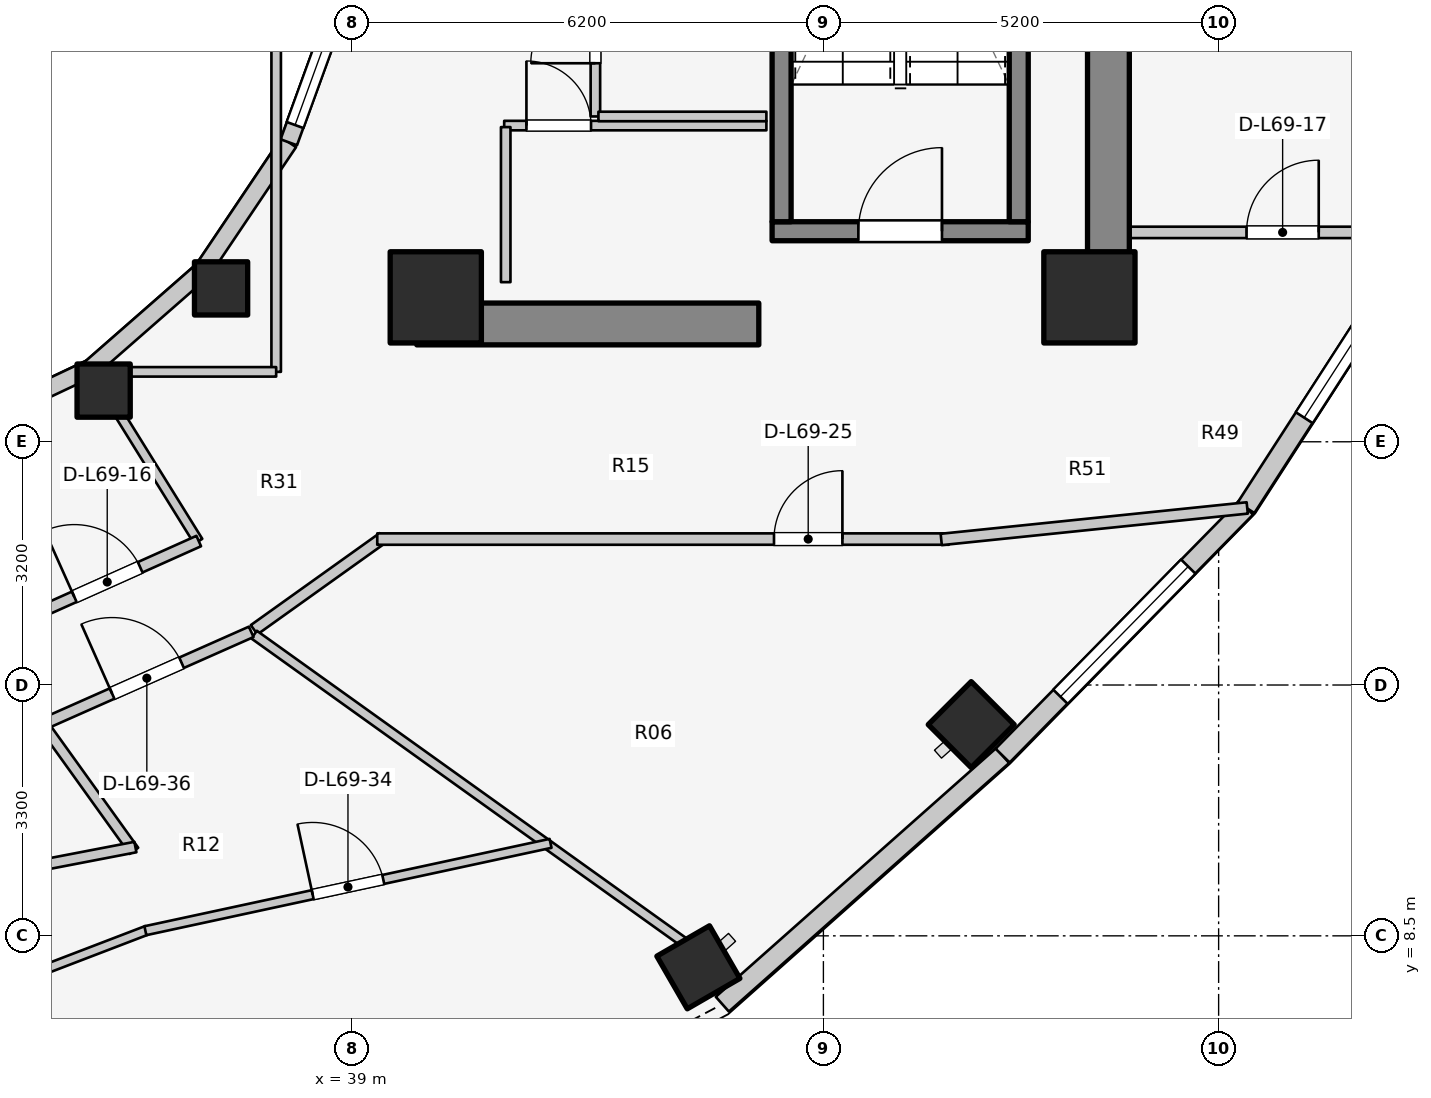
"""IFC4 building model, lengths in metres.
Left out: names, types, materials, properties, quantities, classifications, styles, units other than length and angle.
Written with IfcOpenShell. Run it as: python <this file> out.ifc"""

import sys

from ifc_helpers import new_model, si_unit, direction, frame, frame_2d, origin, origin_2d, place, context, subcontext, project, spatial, rectangle, extrude, element, fill, save


model = new_model("IFC4")
c1 = context("Model", 3, precision=1e-05, world=origin(), true_north=direction((0.0, 1.0)))
c2 = subcontext(c1, "Body", "Model", "MODEL_VIEW")
j1 = project(units=[si_unit("LENGTHUNIT", "METRE"), si_unit("PLANEANGLEUNIT", "RADIAN")], contexts=[c1])
p1 = place(None, origin())
s1 = spatial("IfcSite", under=j1, at=p1, CompositionType="ELEMENT")
p2 = place(p1, origin())
s2 = spatial("IfcBuilding", under=s1, at=p2, CompositionType="ELEMENT")
p3 = place(p2, frame((0.0, 0.0, 226.4)))
s3 = spatial("IfcBuildingStorey", under=s2, at=p3, CompositionType="ELEMENT", Elevation=226.4)
p4 = place(p3, frame((48.95, 17.05, 0.0), z_axis=(0.0, 0.0, 1.0), x_axis=(0.0, 1.0, 0.0)))
e1 = element("IfcWall", 1, at=p4, inside=s3, PredefinedType="SHEAR", context=c2, shape_type="SweptSolid", body=[
    extrude(rectangle(XDim=12.8, YDim=0.55, at=frame_2d((6.4, 0.0))), origin(), (0.0, 0.0, 1.0), 3.1),
])
p5 = place(p3, frame((39.85, 16.55, 0.0), z_axis=(0.0, 0.0, 1.0), x_axis=(1.0, 0.0, 0.0)))
e2 = element("IfcWall", 2, at=p5, inside=s3, PredefinedType="SHEAR", context=c2, shape_type="SweptSolid", body=[
    extrude(rectangle(XDim=4.5, YDim=0.55, at=frame_2d((2.25, 0.0))), origin(), (0.0, 0.0, 1.0), 3.1),
])
p6 = place(p3, frame((44.525, 17.77, 0.0), z_axis=(0.0, 0.0, 1.0), x_axis=(1.0, 0.0, 0.0)))
e3 = element("IfcWall", 3, at=p6, inside=s3, PredefinedType="SOLIDWALL", context=c2, shape_type="SweptSolid", body=[
    extrude(rectangle(XDim=3.37, YDim=0.25, at=frame_2d((1.685, 0.0))), origin(), (0.0, 0.0, 1.0), 3.1),
])
p7 = place(p6, frame((1.135, 0.0, 0.0)))
e4 = element("IfcOpeningElement", 4, at=p7, cuts=e3, PredefinedType="OPENING", context=c2, shape_type="SweptSolid", body=[
    extrude(rectangle(XDim=1.1, YDim=2.1, at=frame_2d((0.55, 1.05))), frame((0.0, 0.135, 0.0), z_axis=(0.0, -1.0, 0.0), x_axis=(1.0, 0.0, 0.0)), (0.0, 0.0, 1.0), 0.27),
])
for number, where, z_axis, x_axis in (
    (5, (44.65, 17.895, 0.0), (0.0, 0.0, 1.0), (0.0, 1.0, 0.0)),
    (6, (47.77, 17.895, 0.0), (0.0, 0.0, 1.0), (0.0, 1.0, 0.0)),
):
    element("IfcWall", number, at=place(p3, frame(where, z_axis=z_axis, x_axis=x_axis)), inside=s3, PredefinedType="SOLIDWALL", context=c2, shape_type="SweptSolid", body=[
        extrude(rectangle(XDim=7.81, YDim=0.25, at=frame_2d((3.905, 0.0))), origin(), (0.0, 0.0, 1.0), 3.1),
    ])
for number, where, z_axis, x_axis in (
    (7, (40.1, 16.9, 0.0), (0.0, 0.0, 1.0), (1.0, 0.0, 0.0)),
    (8, (48.7, 16.9, 0.0), (0.0, 0.0, 1.0), (1.0, 0.0, 0.0)),
):
    element("IfcColumn", number, at=place(p3, frame(where, z_axis=z_axis, x_axis=x_axis)), inside=s3, PredefinedType="COLUMN", context=c2, shape_type="SweptSolid", body=[
        extrude(rectangle(XDim=1.2, YDim=1.2, at=origin_2d()), origin(), (0.0, 0.0, 1.0), 3.1),
    ])
p8 = place(p3, frame((35.73, 15.673, 0.0), z_axis=(0.0, 0.0, 1.0), x_axis=(1.0, 0.0, 0.0)))
e9 = element("IfcColumn", 9, at=p8, inside=s3, PredefinedType="COLUMN", context=c2, shape_type="SweptSolid", body=[
    extrude(rectangle(XDim=0.7, YDim=0.7, at=origin_2d()), origin(), (0.0, 0.0, 1.0), 3.1),
])
p9 = place(p3, frame((43.555, 8.086, 0.0), z_axis=(0.0, 0.0, 1.0), x_axis=(0.5, -0.866025403784, 0.0)))
e10 = element("IfcColumn", 10, at=p9, inside=s3, PredefinedType="COLUMN", context=c2, shape_type="SweptSolid", body=[
    extrude(rectangle(XDim=0.8, YDim=0.8, at=origin_2d()), origin(), (0.0, 0.0, 1.0), 3.1),
])
p10 = place(p3, frame((37.275, 17.018, 0.0), z_axis=(0.0, 0.0, 1.0), x_axis=(1.0, 0.0, 0.0)))
e11 = element("IfcColumn", 11, at=p10, inside=s3, PredefinedType="COLUMN", context=c2, shape_type="SweptSolid", body=[
    extrude(rectangle(XDim=0.7, YDim=0.7, at=origin_2d()), origin(), (0.0, 0.0, 1.0), 3.1),
])
p11 = place(p3, frame((47.145, 11.279, 0.0), z_axis=(0.0, 0.0, 1.0), x_axis=(0.707106781187, -0.707106781187, 0.0)))
e12 = element("IfcColumn", 12, at=p11, inside=s3, PredefinedType="COLUMN", context=c2, shape_type="SweptSolid", body=[
    extrude(rectangle(XDim=0.8, YDim=0.8, at=origin_2d()), origin(), (0.0, 0.0, 1.0), 3.1),
])
p12 = place(p3, frame((33.843, 15.157, 0.0), z_axis=(0.0, 0.0, 1.0), x_axis=(0.904179699603, 0.427152280606, 0.0)))
e13 = element("IfcWall", 13, at=p12, inside=s3, PredefinedType="STANDARD", context=c2, shape_type="SweptSolid", body=[
    extrude(rectangle(XDim=1.899, YDim=0.23, at=frame_2d((0.95, 0.0))), origin(), (0.0, 0.0, 1.0), 2.16),
])
p13 = place(p3, frame((35.56, 15.968, 0.0), z_axis=(0.0, 0.0, 1.0), x_axis=(0.752576694707, 0.658504607869, 0.0)))
e14 = element("IfcWall", 14, at=p13, inside=s3, PredefinedType="STANDARD", context=c2, shape_type="SweptSolid", body=[
    extrude(rectangle(XDim=1.959, YDim=0.23, at=frame_2d((0.98, 0.0))), origin(), (0.0, 0.0, 1.0), 2.16),
])
p14 = place(p3, frame((37.035, 17.258, 0.0), z_axis=(0.0, 0.0, 1.0), x_axis=(0.558197800898, 0.829707909492, 0.0)))
e15 = element("IfcWall", 15, at=p14, inside=s3, PredefinedType="STANDARD", context=c2, shape_type="SweptSolid", body=[
    extrude(rectangle(XDim=2.027, YDim=0.23, at=frame_2d((1.013, 0.0))), origin(), (0.0, 0.0, 1.0), 2.16),
])
p15 = place(p3, frame((38.166, 18.94, 0.0), z_axis=(0.0, 0.0, 1.0), x_axis=(0.341423187295, 0.93990968033, 0.0)))
e16 = element("IfcWall", 16, at=p15, inside=s3, PredefinedType="STANDARD", context=c2, shape_type="SweptSolid", body=[
    extrude(rectangle(XDim=2.084, YDim=0.23, at=frame_2d((1.042, 0.0))), origin(), (0.0, 0.0, 1.0), 2.84),
])
p16 = place(p15, frame((0.242, 0.0, 0.85)))
e17 = element("IfcOpeningElement", 17, at=p16, cuts=e16, PredefinedType="OPENING", context=c2, shape_type="SweptSolid", body=[
    extrude(rectangle(XDim=1.6, YDim=1.65, at=frame_2d((0.8, 0.825))), frame((0.0, 0.125, 0.0), z_axis=(0.0, -1.0, 0.0), x_axis=(1.0, 0.0, 0.0)), (0.0, 0.0, 1.0), 0.25),
])
p17 = place(p3, frame((43.87, 7.601, 0.0), z_axis=(0.0, 0.0, 1.0), x_axis=(0.748165854006, 0.663511759428, 0.0)))
e18 = element("IfcWall", 18, at=p17, inside=s3, PredefinedType="STANDARD", context=c2, shape_type="SweptSolid", body=[
    extrude(rectangle(XDim=4.929, YDim=0.26, at=frame_2d((2.464, 0.0))), origin(), (0.0, 0.0, 1.0), 2.85),
])
p18 = place(p3, frame((47.558, 10.871, 0.0), z_axis=(0.0, 0.0, 1.0), x_axis=(0.700642973333, 0.713512034881, 0.0)))
e19 = element("IfcWall", 19, at=p18, inside=s3, PredefinedType="STANDARD", context=c2, shape_type="SweptSolid", body=[
    extrude(rectangle(XDim=4.572, YDim=0.26, at=frame_2d((2.286, 0.0))), origin(), (0.0, 0.0, 1.0), 2.85),
])
p19 = place(p18, frame((1.086, 0.0, 0.75)))
e20 = element("IfcOpeningElement", 20, at=p19, cuts=e19, PredefinedType="OPENING", context=c2, shape_type="SweptSolid", body=[
    extrude(rectangle(XDim=2.4, YDim=1.7, at=frame_2d((1.2, 0.85))), frame((0.0, 0.14, 0.0), z_axis=(0.0, -1.0, 0.0), x_axis=(1.0, 0.0, 0.0)), (0.0, 0.0, 1.0), 0.28),
])
p20 = place(p3, frame((50.761, 14.133, 0.0), z_axis=(0.0, 0.0, 1.0), x_axis=(0.542641766008, 0.839964233634, 0.0)))
e21 = element("IfcWall", 21, at=p20, inside=s3, PredefinedType="STANDARD", context=c2, shape_type="SweptSolid", body=[
    extrude(rectangle(XDim=4.319, YDim=0.26, at=frame_2d((2.16, 0.0))), origin(), (0.0, 0.0, 1.0), 2.85),
])
p21 = place(p20, frame((1.41, 0.0, 0.75)))
e22 = element("IfcOpeningElement", 22, at=p21, cuts=e21, PredefinedType="OPENING", context=c2, shape_type="SweptSolid", body=[
    extrude(rectangle(XDim=1.5, YDim=1.6, at=frame_2d((0.75, 0.8))), frame((0.0, 0.14, 0.0), z_axis=(0.0, -1.0, 0.0), x_axis=(1.0, 0.0, 0.0)), (0.0, 0.0, 1.0), 0.28),
])
p22 = place(p3, frame((41.0, 19.16, 0.0), z_axis=(0.0, 0.0, 1.0), x_axis=(1.0, 0.0, 0.0)))
e23 = element("IfcWall", 23, at=p22, inside=s3, PredefinedType="PARTITIONING", context=c2, shape_type="SweptSolid", body=[
    extrude(rectangle(XDim=3.45, YDim=0.125, at=frame_2d((1.725, 0.0))), origin(), (0.0, 0.0, 1.0), 2.12),
])
p23 = place(p22, frame((0.293, 0.0, 0.0)))
e24 = element("IfcOpeningElement", 24, at=p23, cuts=e23, PredefinedType="OPENING", context=c2, shape_type="SweptSolid", body=[
    extrude(rectangle(XDim=0.85, YDim=2.05, at=frame_2d((0.425, 1.025))), frame((0.0, 0.073, 0.0), z_axis=(0.0, -1.0, 0.0), x_axis=(1.0, 0.0, 0.0)), (0.0, 0.0, 1.0), 0.145),
])
p24 = place(p3, frame((41.02, 17.1, 0.0), z_axis=(0.0, 0.0, 1.0), x_axis=(0.0, 1.0, 0.0)))
e25 = element("IfcWall", 25, at=p24, inside=s3, PredefinedType="PARTITIONING", context=c2, shape_type="SweptSolid", body=[
    extrude(rectangle(XDim=2.04, YDim=0.125, at=frame_2d((1.02, 0.0))), origin(), (0.0, 0.0, 1.0), 2.855),
])
p25 = place(p3, frame((42.2, 19.28, 0.0), z_axis=(0.0, 0.0, 1.0), x_axis=(0.0, 1.0, 0.0)))
e26 = element("IfcWall", 26, at=p25, inside=s3, PredefinedType="PARTITIONING", context=c2, shape_type="SweptSolid", body=[
    extrude(rectangle(XDim=2.4, YDim=0.125, at=frame_2d((1.2, 0.0))), origin(), (0.0, 0.0, 1.0), 2.855),
])
p26 = place(p25, frame((0.7, 0.0, 0.0)))
e27 = element("IfcOpeningElement", 27, at=p26, cuts=e26, PredefinedType="OPENING", context=c2, shape_type="SweptSolid", body=[
    extrude(rectangle(XDim=0.85, YDim=2.05, at=frame_2d((0.425, 1.025))), frame((0.0, 0.073, 0.0), z_axis=(0.0, -1.0, 0.0), x_axis=(1.0, 0.0, 0.0)), (0.0, 0.0, 1.0), 0.145),
])
p27 = place(p3, frame((42.24, 19.28, 0.0), z_axis=(0.0, 0.0, 1.0), x_axis=(1.0, 0.0, 0.0)))
e28 = element("IfcWall", 28, at=p27, inside=s3, PredefinedType="PARTITIONING", context=c2, shape_type="SweptSolid", body=[
    extrude(rectangle(XDim=2.21, YDim=0.125, at=frame_2d((1.105, 0.0))), origin(), (0.0, 0.0, 1.0), 2.12),
])
p28 = place(p3, frame((35.55, 15.985, 0.0), z_axis=(0.0, 0.0, 1.0), x_axis=(0.527527080983, -0.849538215049, 0.0)))
e29 = element("IfcWall", 29, at=p28, inside=s3, PredefinedType="PARTITIONING", context=c2, shape_type="SweptSolid", body=[
    extrude(rectangle(XDim=2.701, YDim=0.125, at=frame_2d((1.351, 0.0))), origin(), (0.0, 0.0, 1.0), 2.376),
])
p29 = place(p3, frame((34.573, 12.616, 0.0), z_axis=(0.0, 0.0, 1.0), x_axis=(0.912628408652, 0.408790151203, 0.0)))
e30 = element("IfcWall", 30, at=p29, inside=s3, PredefinedType="PARTITIONING", context=c2, shape_type="SweptSolid", body=[
    extrude(rectangle(XDim=2.638, YDim=0.15, at=frame_2d((1.319, 0.0))), origin(), (0.0, 0.0, 1.0), 2.376),
])
p30 = place(p29, frame((0.844, 0.0, 0.0)))
e31 = element("IfcOpeningElement", 31, at=p30, cuts=e30, PredefinedType="OPENING", context=c2, shape_type="SweptSolid", body=[
    extrude(rectangle(XDim=0.95, YDim=2.1, at=frame_2d((0.475, 1.05))), frame((0.0, 0.085, 0.0), z_axis=(0.0, -1.0, 0.0), x_axis=(1.0, 0.0, 0.0)), (0.0, 0.0, 1.0), 0.17),
])
p31 = place(p3, frame((38.0, 15.92, 0.0), z_axis=(0.0, 0.0, 1.0), x_axis=(0.0, 1.0, 0.0)))
e32 = element("IfcWall", 32, at=p31, inside=s3, PredefinedType="PARTITIONING", context=c2, shape_type="SweptSolid", body=[
    extrude(rectangle(XDim=4.28, YDim=0.125, at=frame_2d((2.14, 0.0))), origin(), (0.0, 0.0, 1.0), 2.232),
])
p32 = place(p3, frame((35.4, 15.92, 0.0), z_axis=(0.0, 0.0, 1.0), x_axis=(1.0, 0.0, 0.0)))
e33 = element("IfcWall", 33, at=p32, inside=s3, PredefinedType="PARTITIONING", context=c2, shape_type="SweptSolid", body=[
    extrude(rectangle(XDim=2.6, YDim=0.125, at=frame_2d((1.3, 0.0))), origin(), (0.0, 0.0, 1.0), 2.232),
])
p33 = place(p3, frame((48.95, 17.755, 0.0), z_axis=(0.0, 0.0, 1.0), x_axis=(1.0, 0.0, 0.0)))
e34 = element("IfcWall", 34, at=p33, inside=s3, PredefinedType="PARTITIONING", context=c2, shape_type="SweptSolid", body=[
    extrude(rectangle(XDim=4.175, YDim=0.15, at=frame_2d((2.087, 0.0))), origin(), (0.0, 0.0, 1.0), 2.855),
])
p34 = place(p33, frame((1.817, 0.0, 0.0)))
e35 = element("IfcOpeningElement", 35, at=p34, cuts=e34, PredefinedType="OPENING", context=c2, shape_type="SweptSolid", body=[
    extrude(rectangle(XDim=0.95, YDim=2.1, at=frame_2d((0.475, 1.05))), frame((0.0, 0.085, 0.0), z_axis=(0.0, -1.0, 0.0), x_axis=(1.0, 0.0, 0.0)), (0.0, 0.0, 1.0), 0.17),
])
p35 = place(p3, frame((37.71, 12.527, 0.0), z_axis=(0.0, 0.0, 1.0), x_axis=(0.813780999276, 0.581171648669, 0.0)))
e36 = element("IfcWall", 36, at=p35, inside=s3, PredefinedType="PARTITIONING", context=c2, shape_type="SweptSolid", body=[
    extrude(rectangle(XDim=2.082, YDim=0.15, at=frame_2d((1.041, 0.0))), origin(), (0.0, 0.0, 1.0), 2.376),
])
p36 = place(p3, frame((39.33, 13.72, 0.0), z_axis=(0.0, 0.0, 1.0), x_axis=(1.0, 0.0, 0.0)))
e37 = element("IfcWall", 37, at=p36, inside=s3, PredefinedType="PARTITIONING", context=c2, shape_type="SweptSolid", body=[
    extrude(rectangle(XDim=7.52, YDim=0.15, at=frame_2d((3.76, 0.0))), origin(), (0.0, 0.0, 1.0), 2.376),
])
p37 = place(p36, frame((5.22, 0.0, 0.0)))
e38 = element("IfcOpeningElement", 38, at=p37, cuts=e37, PredefinedType="OPENING", context=c2, shape_type="SweptSolid", body=[
    extrude(rectangle(XDim=0.9, YDim=2.1, at=frame_2d((0.45, 1.05))), frame((0.0, 0.085, 0.0), z_axis=(0.0, -1.0, 0.0), x_axis=(1.0, 0.0, 0.0)), (0.0, 0.0, 1.0), 0.17),
])
p38 = place(p3, frame((46.75, 13.715, 0.0), z_axis=(0.0, 0.0, 1.0), x_axis=(0.994734711466, 0.102483431859, 0.0)))
e39 = element("IfcWall", 39, at=p38, inside=s3, PredefinedType="PARTITIONING", context=c2, shape_type="SweptSolid", body=[
    extrude(rectangle(XDim=4.047, YDim=0.15, at=frame_2d((2.024, 0.0))), origin(), (0.0, 0.0, 1.0), 2.22),
])
p39 = place(p3, frame((37.71, 12.463, 0.0), z_axis=(0.0, 0.0, 1.0), x_axis=(0.813163816543, -0.582034885093, 0.0)))
e40 = element("IfcWall", 40, at=p39, inside=s3, PredefinedType="PARTITIONING", context=c2, shape_type="SweptSolid", body=[
    extrude(rectangle(XDim=6.955, YDim=0.125, at=frame_2d((3.477, 0.0))), origin(), (0.0, 0.0, 1.0), 2.376),
])
p40 = place(p3, frame((31.953, 6.908, 0.0), z_axis=(0.0, 0.0, 1.0), x_axis=(0.933766866443, 0.357881878744, 0.0)))
e41 = element("IfcWall", 41, at=p40, inside=s3, PredefinedType="MOVABLE", context=c2, shape_type="SweptSolid", body=[
    extrude(rectangle(XDim=4.653, YDim=0.12, at=frame_2d((2.327, 0.0))), origin(), (0.0, 0.0, 1.0), 2.376),
])
p41 = place(p3, frame((36.279, 8.567, 0.0), z_axis=(0.0, 0.0, 1.0), x_axis=(0.977534972695, 0.210773283785, 0.0)))
e42 = element("IfcWall", 42, at=p41, inside=s3, PredefinedType="MOVABLE", context=c2, shape_type="SweptSolid", body=[
    extrude(rectangle(XDim=5.453, YDim=0.12, at=frame_2d((2.727, 0.0))), origin(), (0.0, 0.0, 1.0), 2.376),
])
p42 = place(p41, frame((2.252, 0.0, 0.0)))
e43 = element("IfcOpeningElement", 43, at=p42, cuts=e42, PredefinedType="OPENING", context=c2, shape_type="SweptSolid", body=[
    extrude(rectangle(XDim=0.95, YDim=2.1, at=frame_2d((0.475, 1.05))), frame((0.0, 0.07, 0.0), z_axis=(0.0, -1.0, 0.0), x_axis=(1.0, 0.0, 0.0)), (0.0, 0.0, 1.0), 0.14),
])
p43 = place(p3, frame((34.903, 11.324, 0.0), z_axis=(0.0, 0.0, 1.0), x_axis=(0.583259891741, -0.812285601673, 0.0)))
e44 = element("IfcWall", 44, at=p43, inside=s3, PredefinedType="PLUMBINGWALL", context=c2, shape_type="SweptSolid", body=[
    extrude(rectangle(XDim=2.1, YDim=0.14, at=frame_2d((1.05, 0.0))), origin(), (0.0, 0.0, 1.0), 2.385),
])
p44 = place(p3, frame((31.951, 8.861, 0.0), z_axis=(0.0, 0.0, 1.0), x_axis=(0.98198484664, 0.188959680803, 0.0)))
e45 = element("IfcWall", 45, at=p44, inside=s3, PredefinedType="PLUMBINGWALL", context=c2, shape_type="SweptSolid", body=[
    extrude(rectangle(XDim=4.274, YDim=0.14, at=frame_2d((2.137, 0.0))), origin(), (0.0, 0.0, 1.0), 2.376),
])
p45 = place(p44, frame((1.687, 0.0, 0.0)))
e46 = element("IfcOpeningElement", 46, at=p45, cuts=e45, PredefinedType="OPENING", context=c2, shape_type="SweptSolid", body=[
    extrude(rectangle(XDim=0.9, YDim=2.1, at=frame_2d((0.45, 1.05))), frame((0.0, 0.08, 0.0), z_axis=(0.0, -1.0, 0.0), x_axis=(1.0, 0.0, 0.0)), (0.0, 0.0, 1.0), 0.16),
])
p46 = place(p3, frame((34.925, 11.281, 0.0), z_axis=(0.0, 0.0, 1.0), x_axis=(0.914139569865, 0.405399613724, 0.0)))
e47 = element("IfcWall", 47, at=p46, inside=s3, PredefinedType="PARTITIONING", context=c2, shape_type="SweptSolid", body=[
    extrude(rectangle(XDim=3.005, YDim=0.15, at=frame_2d((1.502, 0.0))), origin(), (0.0, 0.0, 1.0), 2.376),
])
p47 = place(p46, frame((1.002, 0.0, 0.0)))
e48 = element("IfcOpeningElement", 48, at=p47, cuts=e47, PredefinedType="OPENING", context=c2, shape_type="SweptSolid", body=[
    extrude(rectangle(XDim=1.0, YDim=2.1, at=frame_2d((0.5, 1.05))), frame((0.0, 0.085, 0.0), z_axis=(0.0, -1.0, 0.0), x_axis=(1.0, 0.0, 0.0)), (0.0, 0.0, 1.0), 0.17),
])
p48 = place(p16, origin())
e49 = element("IfcWindow", 49, at=p48, inside=s3, PartitioningType="SINGLE_PANEL", PredefinedType="WINDOW", context=c2, shape_type="SweptSolid", body=[
    extrude(rectangle(XDim=1.6, YDim=1.65, at=frame_2d((0.8, 0.825))), frame((0.0, 0.03, 0.0), z_axis=(0.0, -1.0, 0.0), x_axis=(1.0, 0.0, 0.0)), (0.0, 0.0, 1.0), 0.06),
])
fill(e17, e49)
p49 = place(p19, origin())
e50 = element("IfcWindow", 50, at=p49, inside=s3, PartitioningType="SINGLE_PANEL", PredefinedType="WINDOW", context=c2, shape_type="SweptSolid", body=[
    extrude(rectangle(XDim=2.4, YDim=1.7, at=frame_2d((1.2, 0.85))), frame((0.0, 0.03, 0.0), z_axis=(0.0, -1.0, 0.0), x_axis=(1.0, 0.0, 0.0)), (0.0, 0.0, 1.0), 0.06),
])
fill(e20, e50)
p50 = place(p21, origin())
e51 = element("IfcWindow", 51, at=p50, inside=s3, PartitioningType="SINGLE_PANEL", PredefinedType="WINDOW", context=c2, shape_type="SweptSolid", body=[
    extrude(rectangle(XDim=1.5, YDim=1.6, at=frame_2d((0.75, 0.8))), frame((0.0, 0.03, 0.0), z_axis=(0.0, -1.0, 0.0), x_axis=(1.0, 0.0, 0.0)), (0.0, 0.0, 1.0), 0.06),
])
fill(e22, e51)
p51 = place(p7, origin())
e52 = element("IfcDoor", 52, at=p51, inside=s3, OperationType="SINGLE_SWING_RIGHT", PredefinedType="DOOR", context=c2, shape_type="SweptSolid", body=[
    extrude(rectangle(XDim=1.1, YDim=2.1, at=frame_2d((0.55, 1.05))), frame((0.0, 0.025, 0.0), z_axis=(0.0, -1.0, 0.0), x_axis=(1.0, 0.0, 0.0)), (0.0, 0.0, 1.0), 0.05),
])
fill(e4, e52)
p52 = place(p23, origin())
e53 = element("IfcDoor", 53, at=p52, inside=s3, OperationType="SINGLE_SWING_LEFT", PredefinedType="DOOR", context=c2, shape_type="SweptSolid", body=[
    extrude(rectangle(XDim=0.85, YDim=2.05, at=frame_2d((0.425, 1.025))), frame((0.0, 0.025, 0.0), z_axis=(0.0, -1.0, 0.0), x_axis=(1.0, 0.0, 0.0)), (0.0, 0.0, 1.0), 0.05),
])
fill(e24, e53)
p53 = place(p26, origin())
e54 = element("IfcDoor", 54, at=p53, inside=s3, OperationType="SINGLE_SWING_LEFT", PredefinedType="DOOR", context=c2, shape_type="SweptSolid", body=[
    extrude(rectangle(XDim=0.85, YDim=2.05, at=frame_2d((0.425, 1.025))), frame((0.0, 0.025, 0.0), z_axis=(0.0, -1.0, 0.0), x_axis=(1.0, 0.0, 0.0)), (0.0, 0.0, 1.0), 0.05),
])
fill(e27, e54)
p54 = place(p30, origin())
e55 = element("IfcDoor", 55, at=p54, inside=s3, OperationType="SINGLE_SWING_LEFT", PredefinedType="DOOR", context=c2, shape_type="SweptSolid", body=[
    extrude(rectangle(XDim=0.95, YDim=2.1, at=frame_2d((0.475, 1.05))), frame((0.0, 0.025, 0.0), z_axis=(0.0, -1.0, 0.0), x_axis=(1.0, 0.0, 0.0)), (0.0, 0.0, 1.0), 0.05),
])
fill(e31, e55)
p55 = place(p34, origin())
e56 = element("IfcDoor", 56, at=p55, inside=s3, OperationType="SINGLE_SWING_RIGHT", PredefinedType="DOOR", context=c2, shape_type="SweptSolid", body=[
    extrude(rectangle(XDim=0.95, YDim=2.1, at=frame_2d((0.475, 1.05))), frame((0.0, 0.025, 0.0), z_axis=(0.0, -1.0, 0.0), x_axis=(1.0, 0.0, 0.0)), (0.0, 0.0, 1.0), 0.05),
])
fill(e35, e56)
p56 = place(p37, origin())
e57 = element("IfcDoor", 57, at=p56, inside=s3, OperationType="SINGLE_SWING_RIGHT", PredefinedType="DOOR", context=c2, shape_type="SweptSolid", body=[
    extrude(rectangle(XDim=0.9, YDim=2.1, at=frame_2d((0.45, 1.05))), frame((0.0, 0.025, 0.0), z_axis=(0.0, -1.0, 0.0), x_axis=(1.0, 0.0, 0.0)), (0.0, 0.0, 1.0), 0.05),
])
fill(e38, e57)
p57 = place(p42, origin())
e58 = element("IfcDoor", 58, at=p57, inside=s3, OperationType="SINGLE_SWING_LEFT", PredefinedType="DOOR", context=c2, shape_type="SweptSolid", body=[
    extrude(rectangle(XDim=0.95, YDim=2.1, at=frame_2d((0.475, 1.05))), frame((0.0, 0.025, 0.0), z_axis=(0.0, -1.0, 0.0), x_axis=(1.0, 0.0, 0.0)), (0.0, 0.0, 1.0), 0.05),
])
fill(e43, e58)
p58 = place(p47, origin())
e59 = element("IfcDoor", 59, at=p58, inside=s3, OperationType="SINGLE_SWING_LEFT", PredefinedType="DOOR", context=c2, shape_type="SweptSolid", body=[
    extrude(rectangle(XDim=1.0, YDim=2.1, at=frame_2d((0.5, 1.05))), frame((0.0, 0.025, 0.0), z_axis=(0.0, -1.0, 0.0), x_axis=(1.0, 0.0, 0.0)), (0.0, 0.0, 1.0), 0.05),
])
fill(e48, e59)
save(model, sys.argv[1])
